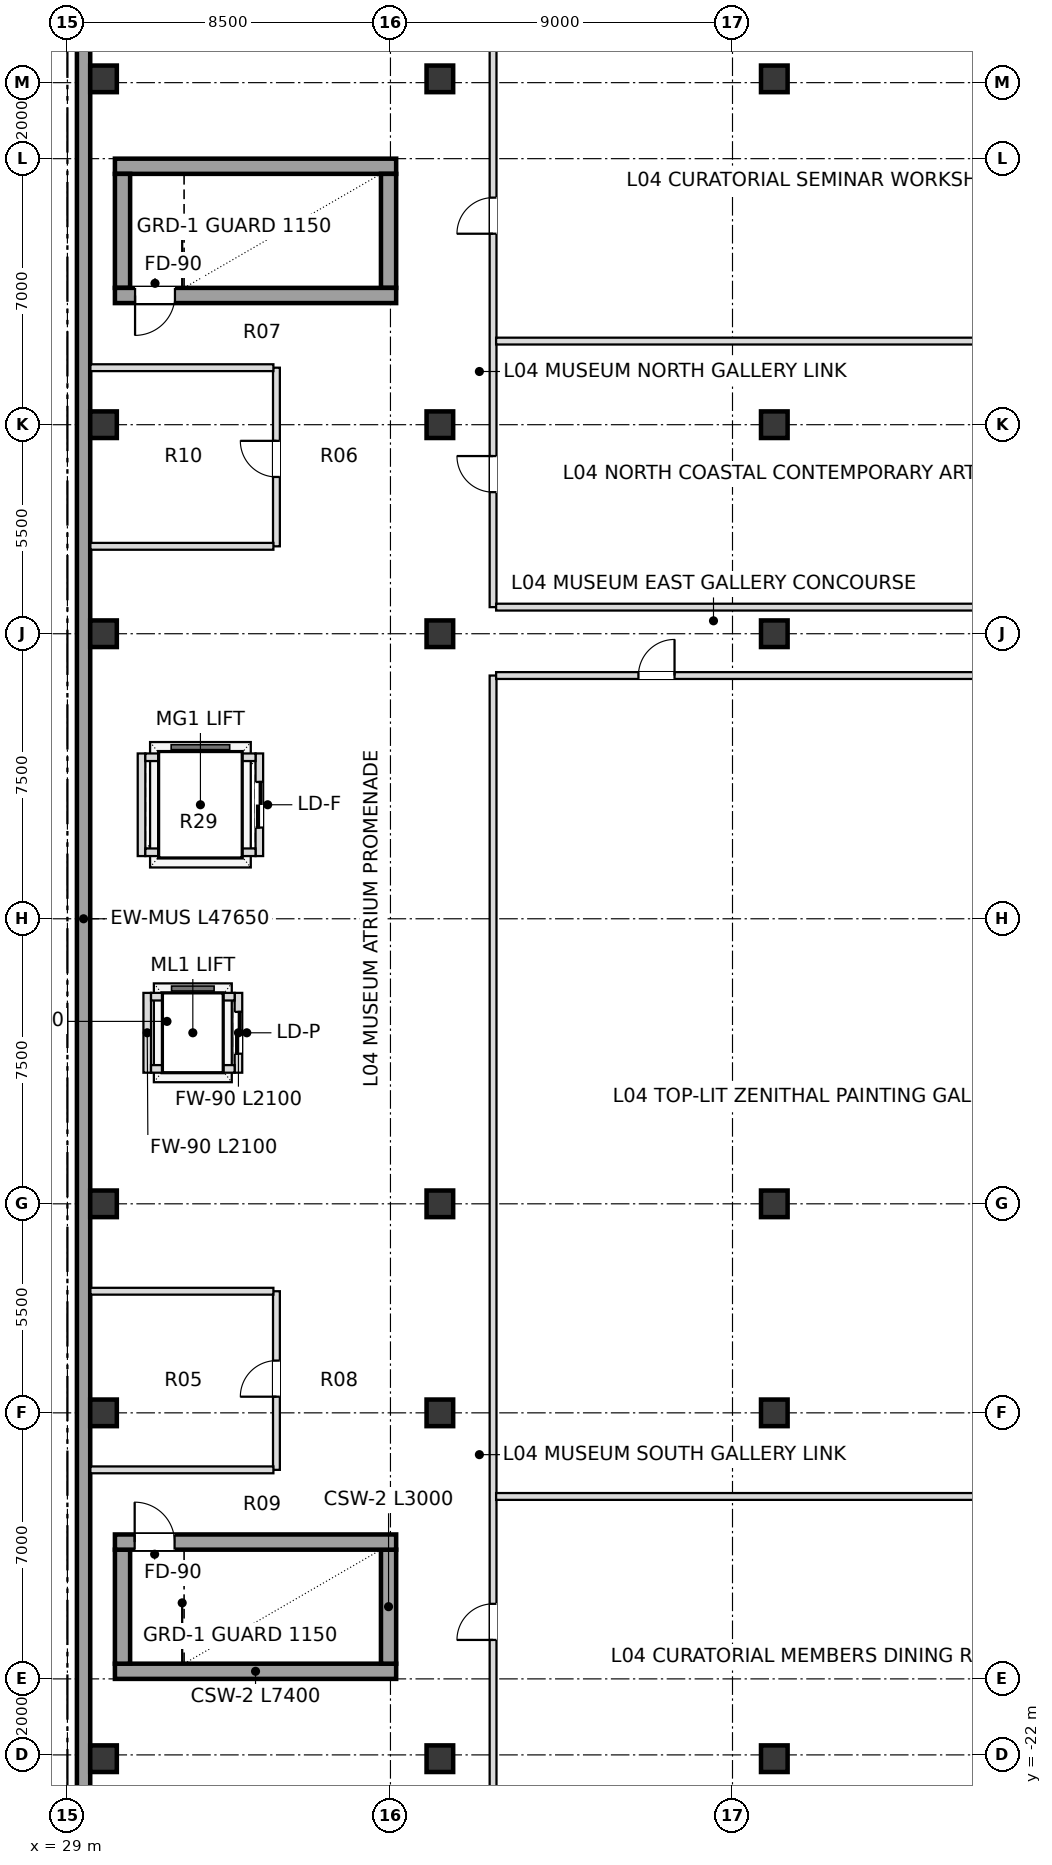
"""IFC4 building model, lengths in metres.
Left out: names, types, materials, properties, quantities, classifications, styles, units other than length and angle.
Written with IfcOpenShell. Run it as: python <this file> out.ifc"""

import sys

from ifc_helpers import new_model, si_unit, direction, frame, frame_2d, origin, origin_2d, place, context, subcontext, project, spatial, rectangle, extrude, element, fill, save


model = new_model("IFC4")
c1 = context("Model", 3, precision=1e-05, world=origin(), true_north=direction((0.0, 1.0)))
c2 = subcontext(c1, "Body", "Model", "MODEL_VIEW")
j1 = project(units=[si_unit("LENGTHUNIT", "METRE"), si_unit("PLANEANGLEUNIT", "RADIAN")], contexts=[c1])
p1 = place(None, origin())
s1 = spatial("IfcSite", under=j1, at=p1, CompositionType="ELEMENT")
p2 = place(p1, origin())
s2 = spatial("IfcBuilding", under=s1, at=p2, CompositionType="ELEMENT")
p3 = place(p2, frame((0.0, 0.0, 22.2)))
s3 = spatial("IfcBuildingStorey", under=s2, at=p3, CompositionType="ELEMENT", Elevation=22.2)
for number, where, z_axis, x_axis in (
    (1, (29.95, -22.1, 0.0), (0.0, 0.0, 1.0), (1.0, 0.0, 0.0)),
    (2, (29.95, -13.0, 0.0), (0.0, 0.0, 1.0), (1.0, 0.0, 0.0)),
    (3, (29.95, -7.5, 0.0), (0.0, 0.0, 1.0), (1.0, 0.0, 0.0)),
    (4, (29.95, 7.5, 0.0), (0.0, 0.0, 1.0), (1.0, 0.0, 0.0)),
    (5, (29.95, 13.0, 0.0), (0.0, 0.0, 1.0), (1.0, 0.0, 0.0)),
    (6, (29.95, 22.1, 0.0), (0.0, 0.0, 1.0), (1.0, 0.0, 0.0)),
    (7, (38.8, -22.1, 0.0), (0.0, 0.0, 1.0), (1.0, 0.0, 0.0)),
    (8, (38.8, -13.0, 0.0), (0.0, 0.0, 1.0), (1.0, 0.0, 0.0)),
    (9, (38.8, -7.5, 0.0), (0.0, 0.0, 1.0), (1.0, 0.0, 0.0)),
    (10, (38.8, 7.5, 0.0), (0.0, 0.0, 1.0), (1.0, 0.0, 0.0)),
    (11, (38.8, 13.0, 0.0), (0.0, 0.0, 1.0), (1.0, 0.0, 0.0)),
    (12, (38.8, 22.1, 0.0), (0.0, 0.0, 1.0), (1.0, 0.0, 0.0)),
    (13, (47.6, -22.1, 0.0), (0.0, 0.0, 1.0), (1.0, 0.0, 0.0)),
    (14, (47.6, -13.0, 0.0), (0.0, 0.0, 1.0), (1.0, 0.0, 0.0)),
    (15, (47.6, -7.5, 0.0), (0.0, 0.0, 1.0), (1.0, 0.0, 0.0)),
    (16, (47.6, 7.5, 0.0), (0.0, 0.0, 1.0), (1.0, 0.0, 0.0)),
    (17, (47.6, 13.0, 0.0), (0.0, 0.0, 1.0), (1.0, 0.0, 0.0)),
    (18, (47.6, 22.1, 0.0), (0.0, 0.0, 1.0), (1.0, 0.0, 0.0)),
):
    element("IfcColumn", number, at=place(p3, frame(where, z_axis=z_axis, x_axis=x_axis)), inside=s3, PredefinedType="COLUMN", context=c2, shape_type="SweptSolid", body=[
        extrude(rectangle(XDim=0.7, YDim=0.7, at=origin_2d()), origin(), (0.0, 0.0, 1.0), 5.4),
    ])
p4 = place(p3, frame((29.425, 23.825, 0.0), z_axis=(0.0, 0.0, 1.0), x_axis=(0.0, -1.0, 0.0)))
e19 = element("IfcWall", 19, at=p4, inside=s3, PredefinedType="SOLIDWALL", context=c2, shape_type="SweptSolid", body=[
    extrude(rectangle(XDim=47.65, YDim=0.35, at=frame_2d((23.825, 0.0))), origin(), (0.0, 0.0, 1.0), 5.13),
])
p5 = place(p3, frame((37.65, -19.8, 0.0), z_axis=(0.0, 0.0, 1.0), x_axis=(-1.0, 0.0, 0.0)))
e20 = element("IfcWall", 20, at=p5, inside=s3, PredefinedType="SHEAR", context=c2, shape_type="SweptSolid", body=[
    extrude(rectangle(XDim=7.4, YDim=0.4, at=frame_2d((3.7, 0.0))), origin(), (0.0, 0.0, 1.0), 5.13),
])
for number, where, z_axis, x_axis in (
    (21, (37.45, -19.6, 0.0), (0.0, 0.0, 1.0), (0.0, 1.0, 0.0)),
    (22, (30.45, -19.6, 0.0), (0.0, 0.0, 1.0), (0.0, 1.0, 0.0)),
):
    element("IfcWall", number, at=place(p3, frame(where, z_axis=z_axis, x_axis=x_axis)), inside=s3, PredefinedType="SHEAR", context=c2, shape_type="SweptSolid", body=[
        extrude(rectangle(XDim=3.0, YDim=0.4, at=frame_2d((1.5, 0.0))), origin(), (0.0, 0.0, 1.0), 5.13),
    ])
p6 = place(p3, frame((30.25, -16.4, 0.0), z_axis=(0.0, 0.0, 1.0), x_axis=(1.0, 0.0, 0.0)))
e23 = element("IfcWall", 23, at=p6, inside=s3, PredefinedType="SHEAR", context=c2, shape_type="SweptSolid", body=[
    extrude(rectangle(XDim=7.4, YDim=0.4, at=frame_2d((3.7, 0.0))), origin(), (0.0, 0.0, 1.0), 5.13),
])
p7 = place(p6, frame((0.52, 0.0, 0.0)))
e24 = element("IfcOpeningElement", 24, at=p7, cuts=e23, PredefinedType="OPENING", context=c2, shape_type="SweptSolid", body=[
    extrude(rectangle(XDim=1.05, YDim=2.15, at=frame_2d((0.525, 1.075))), frame((0.0, 0.21, 0.0), z_axis=(0.0, -1.0, 0.0), x_axis=(1.0, 0.0, 0.0)), (0.0, 0.0, 1.0), 0.42),
])
p8 = place(p3, frame((30.25, 19.8, 0.0), z_axis=(0.0, 0.0, 1.0), x_axis=(1.0, 0.0, 0.0)))
e25 = element("IfcWall", 25, at=p8, inside=s3, PredefinedType="SHEAR", context=c2, shape_type="SweptSolid", body=[
    extrude(rectangle(XDim=7.4, YDim=0.4, at=frame_2d((3.7, 0.0))), origin(), (0.0, 0.0, 1.0), 5.13),
])
for number, where, z_axis, x_axis in (
    (26, (37.45, 16.6, 0.0), (0.0, 0.0, 1.0), (0.0, 1.0, 0.0)),
    (27, (30.45, 16.6, 0.0), (0.0, 0.0, 1.0), (0.0, 1.0, 0.0)),
):
    element("IfcWall", number, at=place(p3, frame(where, z_axis=z_axis, x_axis=x_axis)), inside=s3, PredefinedType="SHEAR", context=c2, shape_type="SweptSolid", body=[
        extrude(rectangle(XDim=3.0, YDim=0.4, at=frame_2d((1.5, 0.0))), origin(), (0.0, 0.0, 1.0), 5.13),
    ])
p9 = place(p3, frame((37.65, 16.4, 0.0), z_axis=(0.0, 0.0, 1.0), x_axis=(-1.0, 0.0, 0.0)))
e28 = element("IfcWall", 28, at=p9, inside=s3, PredefinedType="SHEAR", context=c2, shape_type="SweptSolid", body=[
    extrude(rectangle(XDim=7.4, YDim=0.4, at=frame_2d((3.7, 0.0))), origin(), (0.0, 0.0, 1.0), 5.13),
])
p10 = place(p9, frame((5.82, 0.0, 0.0)))
e29 = element("IfcOpeningElement", 29, at=p10, cuts=e28, PredefinedType="OPENING", context=c2, shape_type="SweptSolid", body=[
    extrude(rectangle(XDim=1.05, YDim=2.15, at=frame_2d((0.525, 1.075))), frame((0.0, 0.21, 0.0), z_axis=(0.0, -1.0, 0.0), x_axis=(1.0, 0.0, 0.0)), (0.0, 0.0, 1.0), 0.42),
])
p11 = place(p3, frame((33.5, -4.05, 0.0), z_axis=(0.0, 0.0, 1.0), x_axis=(0.0, 1.0, 0.0)))
e30 = element("IfcWall", 30, at=p11, inside=s3, PredefinedType="SOLIDWALL", context=c2, shape_type="SweptSolid", body=[
    extrude(rectangle(XDim=2.1, YDim=0.2, at=frame_2d((1.05, 0.0))), origin(), (0.0, 0.0, 1.0), 4.347),
])
p12 = place(p11, frame((0.5, 0.0, 0.0)))
e31 = element("IfcOpeningElement", 31, at=p12, cuts=e30, PredefinedType="OPENING", context=c2, shape_type="SweptSolid", body=[
    extrude(rectangle(XDim=1.1, YDim=2.15, at=frame_2d((0.55, 1.075))), frame((0.0, 0.11, 0.0), z_axis=(0.0, -1.0, 0.0), x_axis=(1.0, 0.0, 0.0)), (0.0, 0.0, 1.0), 0.22),
])
p13 = place(p3, frame((31.1, -4.05, 0.0), z_axis=(0.0, 0.0, 1.0), x_axis=(0.0, 1.0, 0.0)))
e32 = element("IfcWall", 32, at=p13, inside=s3, PredefinedType="SOLIDWALL", context=c2, shape_type="SweptSolid", body=[
    extrude(rectangle(XDim=2.1, YDim=0.2, at=frame_2d((1.05, 0.0))), origin(), (0.0, 0.0, 1.0), 4.347),
])
for number, where, z_axis, x_axis in (
    (33, (31.2, -3.95, 0.0), (0.0, 0.0, 1.0), (1.0, 0.0, 0.0)),
    (34, (31.2, -2.05, 0.0), (0.0, 0.0, 1.0), (1.0, 0.0, 0.0)),
):
    element("IfcWall", number, at=place(p3, frame(where, z_axis=z_axis, x_axis=x_axis)), inside=s3, PredefinedType="SOLIDWALL", context=c2, shape_type="SweptSolid", body=[
        extrude(rectangle(XDim=2.2, YDim=0.2, at=frame_2d((1.1, 0.0))), origin(), (0.0, 0.0, 1.0), 4.347),
    ])
p14 = place(p3, frame((34.05, 1.65, 0.0), z_axis=(0.0, 0.0, 1.0), x_axis=(0.0, 1.0, 0.0)))
e35 = element("IfcWall", 35, at=p14, inside=s3, PredefinedType="SOLIDWALL", context=c2, shape_type="SweptSolid", body=[
    extrude(rectangle(XDim=2.7, YDim=0.2, at=frame_2d((1.35, 0.0))), origin(), (0.0, 0.0, 1.0), 4.347),
])
p15 = place(p14, frame((0.75, 0.0, 0.0)))
e36 = element("IfcOpeningElement", 36, at=p15, cuts=e35, PredefinedType="OPENING", context=c2, shape_type="SweptSolid", body=[
    extrude(rectangle(XDim=1.2, YDim=2.2, at=frame_2d((0.6, 1.1))), frame((0.0, 0.11, 0.0), z_axis=(0.0, -1.0, 0.0), x_axis=(1.0, 0.0, 0.0)), (0.0, 0.0, 1.0), 0.22),
])
p16 = place(p3, frame((30.95, 1.65, 0.0), z_axis=(0.0, 0.0, 1.0), x_axis=(0.0, 1.0, 0.0)))
e37 = element("IfcWall", 37, at=p16, inside=s3, PredefinedType="SOLIDWALL", context=c2, shape_type="SweptSolid", body=[
    extrude(rectangle(XDim=2.7, YDim=0.2, at=frame_2d((1.35, 0.0))), origin(), (0.0, 0.0, 1.0), 4.347),
])
for number, where, z_axis, x_axis in (
    (38, (31.05, 1.75, 0.0), (0.0, 0.0, 1.0), (1.0, 0.0, 0.0)),
    (39, (31.05, 4.25, 0.0), (0.0, 0.0, 1.0), (1.0, 0.0, 0.0)),
):
    element("IfcWall", number, at=place(p3, frame(where, z_axis=z_axis, x_axis=x_axis)), inside=s3, PredefinedType="SOLIDWALL", context=c2, shape_type="SweptSolid", body=[
        extrude(rectangle(XDim=2.9, YDim=0.2, at=frame_2d((1.45, 0.0))), origin(), (0.0, 0.0, 1.0), 4.347),
    ])
p17 = place(p3, frame((34.5, -14.5, 0.0), z_axis=(0.0, 0.0, 1.0), x_axis=(0.0, 1.0, 0.0)))
e40 = element("IfcWall", 40, at=p17, inside=s3, PredefinedType="PARTITIONING", context=c2, shape_type="SweptSolid", body=[
    extrude(rectangle(XDim=4.7, YDim=0.18, at=frame_2d((2.35, 0.0))), origin(), (0.0, 0.0, 1.0), 4.347),
])
p18 = place(p17, frame((1.925, 0.0, 0.0)))
e41 = element("IfcOpeningElement", 41, at=p18, cuts=e40, PredefinedType="OPENING", context=c2, shape_type="SweptSolid", body=[
    extrude(rectangle(XDim=0.95, YDim=2.15, at=frame_2d((0.475, 1.075))), frame((0.0, 0.1, 0.0), z_axis=(0.0, -1.0, 0.0), x_axis=(1.0, 0.0, 0.0)), (0.0, 0.0, 1.0), 0.2),
])
p19 = place(p3, frame((34.5, 9.8, 0.0), z_axis=(0.0, 0.0, 1.0), x_axis=(0.0, 1.0, 0.0)))
e42 = element("IfcWall", 42, at=p19, inside=s3, PredefinedType="PARTITIONING", context=c2, shape_type="SweptSolid", body=[
    extrude(rectangle(XDim=4.7, YDim=0.18, at=frame_2d((2.35, 0.0))), origin(), (0.0, 0.0, 1.0), 4.347),
])
p20 = place(p19, frame((1.825, 0.0, 0.0)))
e43 = element("IfcOpeningElement", 43, at=p20, cuts=e42, PredefinedType="OPENING", context=c2, shape_type="SweptSolid", body=[
    extrude(rectangle(XDim=0.95, YDim=2.15, at=frame_2d((0.475, 1.075))), frame((0.0, 0.1, 0.0), z_axis=(0.0, -1.0, 0.0), x_axis=(1.0, 0.0, 0.0)), (0.0, 0.0, 1.0), 0.2),
])
p21 = place(p3, frame((40.2, -23.645, 0.0), z_axis=(0.0, 0.0, 1.0), x_axis=(0.0, 1.0, 0.0)))
e44 = element("IfcWall", 44, at=p21, inside=s3, PredefinedType="PARTITIONING", context=c2, shape_type="SweptSolid", body=[
    extrude(rectangle(XDim=30.045, YDim=0.18, at=frame_2d((15.022, 0.0))), origin(), (0.0, 0.0, 1.0), 4.347),
])
p22 = place(p21, frame((4.67, 0.0, 0.0)))
e45 = element("IfcOpeningElement", 45, at=p22, cuts=e44, PredefinedType="OPENING", context=c2, shape_type="SweptSolid", body=[
    extrude(rectangle(XDim=0.95, YDim=2.15, at=frame_2d((0.475, 1.075))), frame((0.0, 0.1, 0.0), z_axis=(0.0, -1.0, 0.0), x_axis=(1.0, 0.0, 0.0)), (0.0, 0.0, 1.0), 0.2),
])
p23 = place(p3, frame((40.2, 8.2, 0.0), z_axis=(0.0, 0.0, 1.0), x_axis=(0.0, 1.0, 0.0)))
e46 = element("IfcWall", 46, at=p23, inside=s3, PredefinedType="PARTITIONING", context=c2, shape_type="SweptSolid", body=[
    extrude(rectangle(XDim=15.52, YDim=0.18, at=frame_2d((7.76, 0.0))), origin(), (0.0, 0.0, 1.0), 4.347),
])
p24 = place(p23, frame((3.025, 0.0, 0.0)))
e47 = element("IfcOpeningElement", 47, at=p24, cuts=e46, PredefinedType="OPENING", context=c2, shape_type="SweptSolid", body=[
    extrude(rectangle(XDim=0.95, YDim=2.15, at=frame_2d((0.475, 1.075))), frame((0.0, 0.1, 0.0), z_axis=(0.0, -1.0, 0.0), x_axis=(1.0, 0.0, 0.0)), (0.0, 0.0, 1.0), 0.2),
])
p25 = place(p23, frame((9.825, 0.0, 0.0)))
e48 = element("IfcOpeningElement", 48, at=p25, cuts=e46, PredefinedType="OPENING", context=c2, shape_type="SweptSolid", body=[
    extrude(rectangle(XDim=0.95, YDim=2.15, at=frame_2d((0.475, 1.075))), frame((0.0, 0.1, 0.0), z_axis=(0.0, -1.0, 0.0), x_axis=(1.0, 0.0, 0.0)), (0.0, 0.0, 1.0), 0.2),
])
p26 = place(p3, frame((40.28, -15.2, 0.0), z_axis=(0.0, 0.0, 1.0), x_axis=(1.0, 0.0, 0.0)))
e49 = element("IfcWall", 49, at=p26, inside=s3, PredefinedType="PARTITIONING", context=c2, shape_type="SweptSolid", body=[
    extrude(rectangle(XDim=16.865, YDim=0.18, at=frame_2d((8.433, 0.0))), origin(), (0.0, 0.0, 1.0), 4.264),
])
p27 = place(p3, frame((29.605, -14.5, 0.0), z_axis=(0.0, 0.0, 1.0), x_axis=(1.0, 0.0, 0.0)))
e50 = element("IfcWall", 50, at=p27, inside=s3, PredefinedType="PARTITIONING", context=c2, shape_type="SweptSolid", body=[
    extrude(rectangle(XDim=4.815, YDim=0.18, at=frame_2d((2.407, 0.0))), origin(), (0.0, 0.0, 1.0), 4.264),
])
p28 = place(p3, frame((29.605, -9.8, 0.0), z_axis=(0.0, 0.0, 1.0), x_axis=(1.0, 0.0, 0.0)))
e51 = element("IfcWall", 51, at=p28, inside=s3, PredefinedType="PARTITIONING", context=c2, shape_type="SweptSolid", body=[
    extrude(rectangle(XDim=4.815, YDim=0.18, at=frame_2d((2.407, 0.0))), origin(), (0.0, 0.0, 1.0), 4.347),
])
p29 = place(p3, frame((40.28, 6.4, 0.0), z_axis=(0.0, 0.0, 1.0), x_axis=(1.0, 0.0, 0.0)))
e52 = element("IfcWall", 52, at=p29, inside=s3, PredefinedType="PARTITIONING", context=c2, shape_type="SweptSolid", body=[
    extrude(rectangle(XDim=16.865, YDim=0.18, at=frame_2d((8.433, 0.0))), origin(), (0.0, 0.0, 1.0), 4.347),
])
p30 = place(p29, frame((3.745, 0.0, 0.0)))
e53 = element("IfcOpeningElement", 53, at=p30, cuts=e52, PredefinedType="OPENING", context=c2, shape_type="SweptSolid", body=[
    extrude(rectangle(XDim=0.95, YDim=2.15, at=frame_2d((0.475, 1.075))), frame((0.0, 0.1, 0.0), z_axis=(0.0, -1.0, 0.0), x_axis=(1.0, 0.0, 0.0)), (0.0, 0.0, 1.0), 0.2),
])
p31 = place(p3, frame((40.28, 8.2, 0.0), z_axis=(0.0, 0.0, 1.0), x_axis=(1.0, 0.0, 0.0)))
e54 = element("IfcWall", 54, at=p31, inside=s3, PredefinedType="PARTITIONING", context=c2, shape_type="SweptSolid", body=[
    extrude(rectangle(XDim=16.865, YDim=0.18, at=frame_2d((8.433, 0.0))), origin(), (0.0, 0.0, 1.0), 4.347),
])
for number, where, z_axis, x_axis in (
    (55, (29.605, 9.8, 0.0), (0.0, 0.0, 1.0), (1.0, 0.0, 0.0)),
    (56, (29.605, 14.5, 0.0), (0.0, 0.0, 1.0), (1.0, 0.0, 0.0)),
):
    element("IfcWall", number, at=place(p3, frame(where, z_axis=z_axis, x_axis=x_axis)), inside=s3, PredefinedType="PARTITIONING", context=c2, shape_type="SweptSolid", body=[
        extrude(rectangle(XDim=4.815, YDim=0.18, at=frame_2d((2.407, 0.0))), origin(), (0.0, 0.0, 1.0), 4.347),
    ])
p32 = place(p3, frame((40.28, 15.2, 0.0), z_axis=(0.0, 0.0, 1.0), x_axis=(1.0, 0.0, 0.0)))
e57 = element("IfcWall", 57, at=p32, inside=s3, PredefinedType="PARTITIONING", context=c2, shape_type="SweptSolid", body=[
    extrude(rectangle(XDim=16.865, YDim=0.18, at=frame_2d((8.433, 0.0))), origin(), (0.0, 0.0, 1.0), 4.347),
])
p33 = place(p7, origin())
e58 = element("IfcDoor", 58, at=p33, inside=s3, OperationType="SINGLE_SWING_LEFT", PredefinedType="DOOR", context=c2, shape_type="SweptSolid", body=[
    extrude(rectangle(XDim=1.05, YDim=2.15, at=frame_2d((0.525, 1.075))), frame((0.0, 0.025, 0.0), z_axis=(0.0, -1.0, 0.0), x_axis=(1.0, 0.0, 0.0)), (0.0, 0.0, 1.0), 0.05),
])
fill(e24, e58)
p34 = place(p10, origin())
e59 = element("IfcDoor", 59, at=p34, inside=s3, OperationType="SINGLE_SWING_RIGHT", PredefinedType="DOOR", context=c2, shape_type="SweptSolid", body=[
    extrude(rectangle(XDim=1.05, YDim=2.15, at=frame_2d((0.525, 1.075))), frame((0.0, 0.025, 0.0), z_axis=(0.0, -1.0, 0.0), x_axis=(1.0, 0.0, 0.0)), (0.0, 0.0, 1.0), 0.05),
])
fill(e29, e59)
p35 = place(p12, origin())
e60 = element("IfcDoor", 60, at=p35, inside=s3, OperationType="DOUBLE_DOOR_SLIDING", PredefinedType="DOOR", context=c2, shape_type="SweptSolid", body=[
    extrude(rectangle(XDim=1.1, YDim=2.15, at=frame_2d((0.55, 1.075))), frame((0.0, 0.025, 0.0), z_axis=(0.0, -1.0, 0.0), x_axis=(1.0, 0.0, 0.0)), (0.0, 0.0, 1.0), 0.05),
])
fill(e31, e60)
p36 = place(p15, origin())
e61 = element("IfcDoor", 61, at=p36, inside=s3, OperationType="DOUBLE_DOOR_SLIDING", PredefinedType="DOOR", context=c2, shape_type="SweptSolid", body=[
    extrude(rectangle(XDim=1.2, YDim=2.2, at=frame_2d((0.6, 1.1))), frame((0.0, 0.025, 0.0), z_axis=(0.0, -1.0, 0.0), x_axis=(1.0, 0.0, 0.0)), (0.0, 0.0, 1.0), 0.05),
])
fill(e36, e61)
p37 = place(p24, origin())
e62 = element("IfcDoor", 62, at=p37, inside=s3, OperationType="SINGLE_SWING_RIGHT", PredefinedType="DOOR", context=c2, shape_type="SweptSolid", body=[
    extrude(rectangle(XDim=0.95, YDim=2.15, at=frame_2d((0.475, 1.075))), frame((0.0, 0.025, 0.0), z_axis=(0.0, -1.0, 0.0), x_axis=(1.0, 0.0, 0.0)), (0.0, 0.0, 1.0), 0.05),
])
fill(e47, e62)
p38 = place(p25, origin())
e63 = element("IfcDoor", 63, at=p38, inside=s3, OperationType="SINGLE_SWING_LEFT", PredefinedType="DOOR", context=c2, shape_type="SweptSolid", body=[
    extrude(rectangle(XDim=0.95, YDim=2.15, at=frame_2d((0.475, 1.075))), frame((0.0, 0.025, 0.0), z_axis=(0.0, -1.0, 0.0), x_axis=(1.0, 0.0, 0.0)), (0.0, 0.0, 1.0), 0.05),
])
fill(e48, e63)
p39 = place(p20, origin())
e64 = element("IfcDoor", 64, at=p39, inside=s3, OperationType="SINGLE_SWING_RIGHT", PredefinedType="DOOR", context=c2, shape_type="SweptSolid", body=[
    extrude(rectangle(XDim=0.95, YDim=2.15, at=frame_2d((0.475, 1.075))), frame((0.0, 0.025, 0.0), z_axis=(0.0, -1.0, 0.0), x_axis=(1.0, 0.0, 0.0)), (0.0, 0.0, 1.0), 0.05),
])
fill(e43, e64)
p40 = place(p18, origin())
e65 = element("IfcDoor", 65, at=p40, inside=s3, OperationType="SINGLE_SWING_LEFT", PredefinedType="DOOR", context=c2, shape_type="SweptSolid", body=[
    extrude(rectangle(XDim=0.95, YDim=2.15, at=frame_2d((0.475, 1.075))), frame((0.0, 0.025, 0.0), z_axis=(0.0, -1.0, 0.0), x_axis=(1.0, 0.0, 0.0)), (0.0, 0.0, 1.0), 0.05),
])
fill(e41, e65)
p41 = place(p30, origin())
e66 = element("IfcDoor", 66, at=p41, inside=s3, OperationType="SINGLE_SWING_RIGHT", PredefinedType="DOOR", context=c2, shape_type="SweptSolid", body=[
    extrude(rectangle(XDim=0.95, YDim=2.15, at=frame_2d((0.475, 1.075))), frame((0.0, 0.025, 0.0), z_axis=(0.0, -1.0, 0.0), x_axis=(1.0, 0.0, 0.0)), (0.0, 0.0, 1.0), 0.05),
])
fill(e53, e66)
p42 = place(p22, origin())
e67 = element("IfcDoor", 67, at=p42, inside=s3, OperationType="SINGLE_SWING_LEFT", PredefinedType="DOOR", context=c2, shape_type="SweptSolid", body=[
    extrude(rectangle(XDim=0.95, YDim=2.15, at=frame_2d((0.475, 1.075))), frame((0.0, 0.025, 0.0), z_axis=(0.0, -1.0, 0.0), x_axis=(1.0, 0.0, 0.0)), (0.0, 0.0, 1.0), 0.05),
])
fill(e45, e67)
save(model, sys.argv[1])
